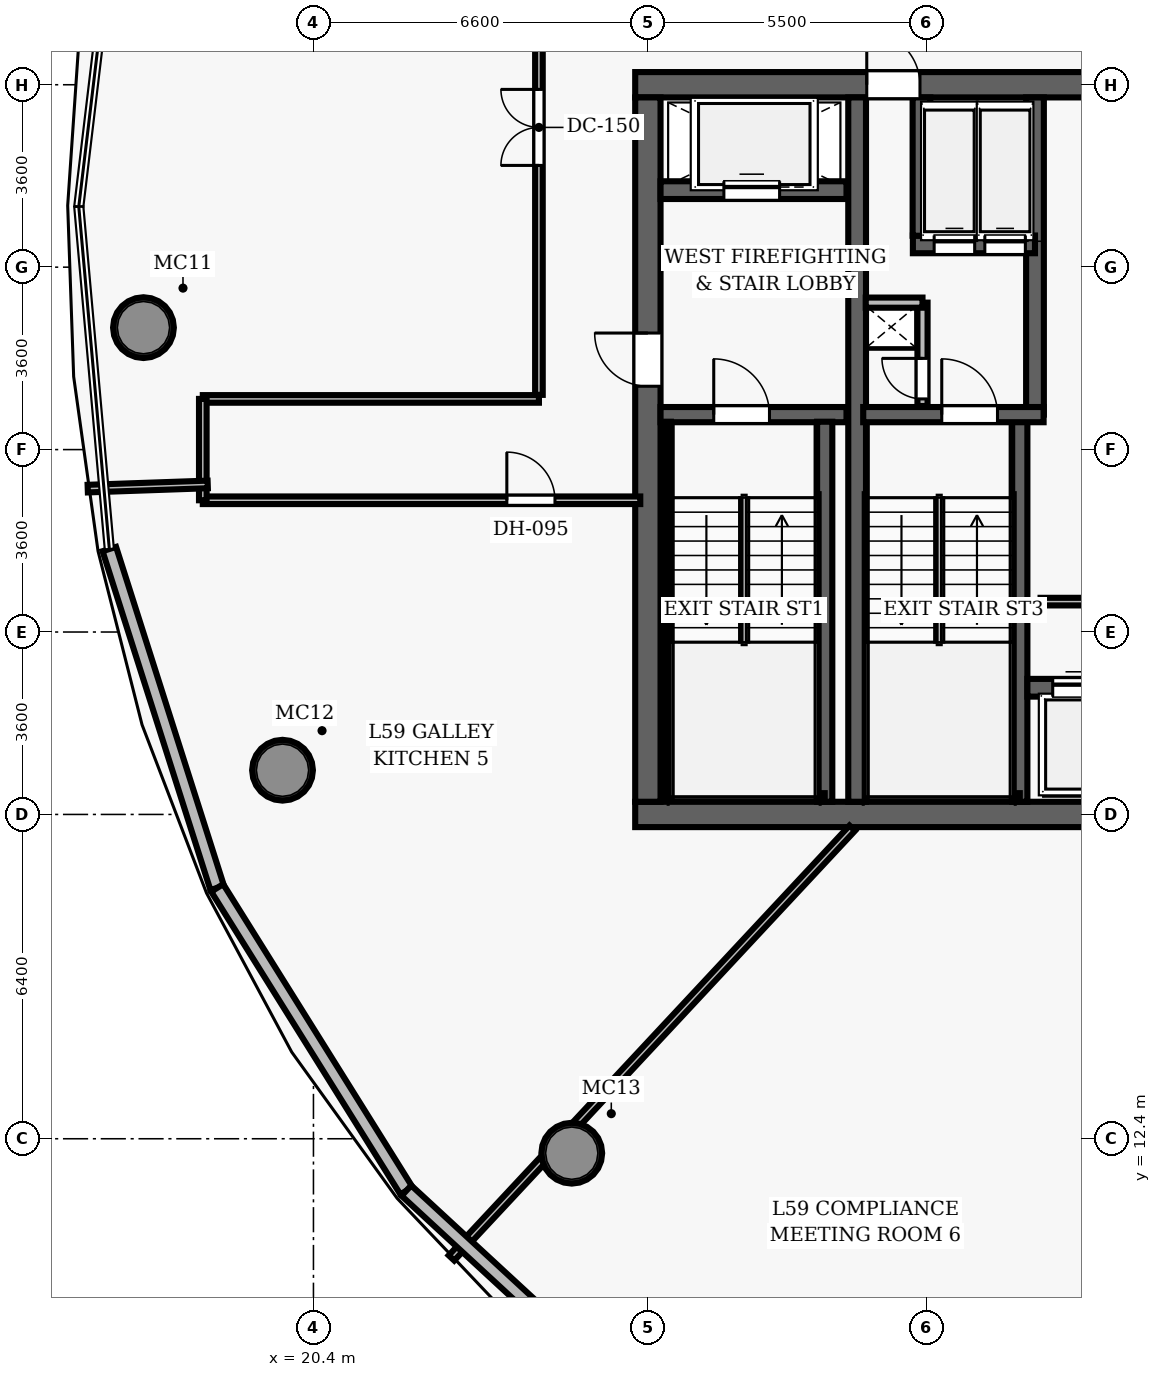
"""IFC4 building model, lengths in metres.
Left out: names, types, materials, properties, quantities, classifications, styles, units other than length and angle.
Written with IfcOpenShell. Run it as: python <this file> out.ifc"""

import sys

from ifc_helpers import new_model, si_unit, direction, frame, frame_2d, origin, origin_2d, place, context, subcontext, project, spatial, rectangle, hollow_circle, extrude, element, fill, save


model = new_model("IFC4")
c1 = context("Model", 3, precision=1e-05, world=origin(), true_north=direction((0.0, 1.0)))
c2 = subcontext(c1, "Body", "Model", "MODEL_VIEW")
j1 = project(units=[si_unit("LENGTHUNIT", "METRE"), si_unit("PLANEANGLEUNIT", "RADIAN")], contexts=[c1])
p1 = place(None, origin())
s1 = spatial("IfcSite", under=j1, at=p1, CompositionType="ELEMENT")
p2 = place(p1, origin())
s2 = spatial("IfcBuilding", under=s1, at=p2, CompositionType="ELEMENT")
p3 = place(p2, frame((0.0, 0.0, 232.8)))
s3 = spatial("IfcBuildingStorey", under=s2, at=p3, CompositionType="ELEMENT", Elevation=232.8)
p4 = place(p3, frame((26.75, 18.8, 0.0), z_axis=(0.0, 0.0, 1.0), x_axis=(1.0, 0.0, 0.0)))
e1 = element("IfcWall", 1, at=p4, inside=s3, PredefinedType="SHEAR", context=c2, shape_type="SweptSolid", body=[
    extrude(rectangle(XDim=22.5, YDim=0.5, at=frame_2d((11.25, 0.0))), origin(), (0.0, 0.0, 1.0), 3.85),
])
p5 = place(p4, frame((14.47, 0.0, 0.0)))
e2 = element("IfcOpeningElement", 2, at=p5, cuts=e1, PredefinedType="OPENING", context=c2, shape_type="SweptSolid", body=[
    extrude(rectangle(XDim=1.05, YDim=2.15, at=frame_2d((0.525, 1.075))), frame((0.0, 0.26, 0.0), z_axis=(0.0, -1.0, 0.0), x_axis=(1.0, 0.0, 0.0)), (0.0, 0.0, 1.0), 0.52),
])
p6 = place(p3, frame((26.75, 33.2, 0.0), z_axis=(0.0, 0.0, 1.0), x_axis=(1.0, 0.0, 0.0)))
e3 = element("IfcWall", 3, at=p6, inside=s3, PredefinedType="SHEAR", context=c2, shape_type="SweptSolid", body=[
    extrude(rectangle(XDim=22.5, YDim=0.5, at=frame_2d((11.25, 0.0))), origin(), (0.0, 0.0, 1.0), 3.85),
])
p7 = place(p6, frame((4.57, 0.0, 0.0)))
e4 = element("IfcOpeningElement", 4, at=p7, cuts=e3, PredefinedType="OPENING", context=c2, shape_type="SweptSolid", body=[
    extrude(rectangle(XDim=1.05, YDim=2.15, at=frame_2d((0.525, 1.075))), frame((0.0, 0.26, 0.0), z_axis=(0.0, -1.0, 0.0), x_axis=(1.0, 0.0, 0.0)), (0.0, 0.0, 1.0), 0.52),
])
p8 = place(p6, frame((14.47, 0.0, 0.0)))
e5 = element("IfcOpeningElement", 5, at=p8, cuts=e3, PredefinedType="OPENING", context=c2, shape_type="SweptSolid", body=[
    extrude(rectangle(XDim=1.05, YDim=2.15, at=frame_2d((0.525, 1.075))), frame((0.0, 0.26, 0.0), z_axis=(0.0, -1.0, 0.0), x_axis=(1.0, 0.0, 0.0)), (0.0, 0.0, 1.0), 0.52),
])
p9 = place(p3, frame((27.0, 19.05, 0.0), z_axis=(0.0, 0.0, 1.0), x_axis=(0.0, 1.0, 0.0)))
e6 = element("IfcWall", 6, at=p9, inside=s3, PredefinedType="SHEAR", context=c2, shape_type="SweptSolid", body=[
    extrude(rectangle(XDim=13.9, YDim=0.5, at=frame_2d((6.95, 0.0))), origin(), (0.0, 0.0, 1.0), 3.85),
])
p10 = place(p9, frame((8.2, 0.0, 0.0)))
e7 = element("IfcOpeningElement", 7, at=p10, cuts=e6, PredefinedType="OPENING", context=c2, shape_type="SweptSolid", body=[
    extrude(rectangle(XDim=1.05, YDim=2.15, at=frame_2d((0.525, 1.075))), frame((0.0, 0.26, 0.0), z_axis=(0.0, -1.0, 0.0), x_axis=(1.0, 0.0, 0.0)), (0.0, 0.0, 1.0), 0.52),
])
p11 = place(p3, frame((31.13, 19.05, 0.0), z_axis=(0.0, 0.0, 1.0), x_axis=(0.0, 1.0, 0.0)))
e8 = element("IfcWall", 8, at=p11, inside=s3, PredefinedType="SHEAR", context=c2, shape_type="SweptSolid", body=[
    extrude(rectangle(XDim=13.9, YDim=0.35, at=frame_2d((6.95, 0.0))), origin(), (0.0, 0.0, 1.0), 3.85),
])
for number, where, z_axis, x_axis in (
    (9, (17.045, 28.406, 0.0), (0.0, 0.0, 1.0), (1.0, 0.0, 0.0)),
    (10, (19.79, 19.673, 0.0), (0.0, 0.0, 1.0), (1.0, 0.0, 0.0)),
    (11, (25.498, 12.115, 0.0), (0.0, 0.0, 1.0), (1.0, 0.0, 0.0)),
):
    element("IfcColumn", number, at=place(p3, frame(where, z_axis=z_axis, x_axis=x_axis)), inside=s3, PredefinedType="COLUMN", context=c2, shape_type="SweptSolid", body=[
        extrude(hollow_circle(Radius=0.6, WallThickness=0.05, at=origin_2d()), origin(), (0.0, 0.0, 1.0), 3.85),
    ])
p12 = place(p3, frame((27.25, 26.69, 0.0), z_axis=(0.0, 0.0, 1.0), x_axis=(1.0, 0.0, 0.0)))
e12 = element("IfcWall", 12, at=p12, inside=s3, PredefinedType="SHEAR", context=c2, shape_type="SweptSolid", body=[
    extrude(rectangle(XDim=3.67, YDim=0.3, at=frame_2d((1.835, 0.0))), origin(), (0.0, 0.0, 1.0), 3.85),
])
p13 = place(p12, frame((1.05, 0.0, 0.0)))
e13 = element("IfcOpeningElement", 13, at=p13, cuts=e12, PredefinedType="OPENING", context=c2, shape_type="SweptSolid", body=[
    extrude(rectangle(XDim=1.1, YDim=2.15, at=frame_2d((0.55, 1.075))), frame((0.0, 0.16, 0.0), z_axis=(0.0, -1.0, 0.0), x_axis=(1.0, 0.0, 0.0)), (0.0, 0.0, 1.0), 0.32),
])
p14 = place(p3, frame((30.49, 19.05, 0.0), z_axis=(0.0, 0.0, 1.0), x_axis=(0.0, 1.0, 0.0)))
e14 = element("IfcWall", 14, at=p14, inside=s3, PredefinedType="SHEAR", context=c2, shape_type="SweptSolid", body=[
    extrude(rectangle(XDim=7.5, YDim=0.3, at=frame_2d((3.75, 0.0))), origin(), (0.0, 0.0, 1.0), 3.85),
])
p15 = place(p3, frame((27.395, 19.1, 0.0), z_axis=(0.0, 0.0, 1.0), x_axis=(0.0, 1.0, 0.0)))
e15 = element("IfcWall", 15, at=p15, inside=s3, PredefinedType="SHEAR", context=c2, shape_type="SweptSolid", body=[
    extrude(rectangle(XDim=7.45, YDim=0.12, at=frame_2d((3.725, 0.0))), origin(), (0.0, 0.0, 1.0), 3.85),
])
p16 = place(p3, frame((27.395, 19.16, 0.0), z_axis=(0.0, 0.0, 1.0), x_axis=(1.0, 0.0, 0.0)))
e16 = element("IfcWall", 16, at=p16, inside=s3, PredefinedType="SHEAR", context=c2, shape_type="SweptSolid", body=[
    extrude(rectangle(XDim=3.095, YDim=0.12, at=frame_2d((1.547, 0.0))), origin(), (0.0, 0.0, 1.0), 3.85),
])
p17 = place(p3, frame((27.25, 31.12, 0.0), z_axis=(0.0, 0.0, 1.0), x_axis=(1.0, 0.0, 0.0)))
e17 = element("IfcWall", 17, at=p17, inside=s3, PredefinedType="SHEAR", context=c2, shape_type="SweptSolid", body=[
    extrude(rectangle(XDim=3.67, YDim=0.35, at=frame_2d((1.835, 0.0))), origin(), (0.0, 0.0, 1.0), 2.915),
])
p18 = place(p17, frame((1.25, 0.0, 0.0)))
e18 = element("IfcOpeningElement", 18, at=p18, cuts=e17, PredefinedType="OPENING", context=c2, shape_type="SweptSolid", body=[
    extrude(rectangle(XDim=1.1, YDim=2.15, at=frame_2d((0.55, 1.075))), frame((0.0, 0.185, 0.0), z_axis=(0.0, -1.0, 0.0), x_axis=(1.0, 0.0, 0.0)), (0.0, 0.0, 1.0), 0.37),
])
p19 = place(p3, frame((34.34, 19.05, 0.0), z_axis=(0.0, 0.0, 1.0), x_axis=(0.0, 1.0, 0.0)))
e19 = element("IfcWall", 19, at=p19, inside=s3, PredefinedType="SHEAR", context=c2, shape_type="SweptSolid", body=[
    extrude(rectangle(XDim=7.5, YDim=0.3, at=frame_2d((3.75, 0.0))), origin(), (0.0, 0.0, 1.0), 3.85),
])
p20 = place(p3, frame((34.64, 26.69, 0.0), z_axis=(0.0, 0.0, 1.0), x_axis=(0.0, 1.0, 0.0)))
e20 = element("IfcWall", 20, at=p20, inside=s3, PredefinedType="SHEAR", context=c2, shape_type="SweptSolid", body=[
    extrude(rectangle(XDim=6.26, YDim=0.35, at=frame_2d((3.13, 0.0))), origin(), (0.0, 0.0, 1.0), 3.85),
])
p21 = place(p3, frame((31.25, 26.69, 0.0), z_axis=(0.0, 0.0, 1.0), x_axis=(1.0, 0.0, 0.0)))
e21 = element("IfcWall", 21, at=p21, inside=s3, PredefinedType="SHEAR", context=c2, shape_type="SweptSolid", body=[
    extrude(rectangle(XDim=3.56, YDim=0.3, at=frame_2d((1.78, 0.0))), origin(), (0.0, 0.0, 1.0), 3.85),
])
p22 = place(p21, frame((1.55, 0.0, 0.0)))
e22 = element("IfcOpeningElement", 22, at=p22, cuts=e21, PredefinedType="OPENING", context=c2, shape_type="SweptSolid", body=[
    extrude(rectangle(XDim=1.1, YDim=2.15, at=frame_2d((0.55, 1.075))), frame((0.0, 0.16, 0.0), z_axis=(0.0, -1.0, 0.0), x_axis=(1.0, 0.0, 0.0)), (0.0, 0.0, 1.0), 0.32),
])
p23 = place(p3, frame((31.3, 19.16, 0.0), z_axis=(0.0, 0.0, 1.0), x_axis=(1.0, 0.0, 0.0)))
e23 = element("IfcWall", 23, at=p23, inside=s3, PredefinedType="SHEAR", context=c2, shape_type="SweptSolid", body=[
    extrude(rectangle(XDim=3.04, YDim=0.12, at=frame_2d((1.52, 0.0))), origin(), (0.0, 0.0, 1.0), 3.85),
])
p24 = place(p3, frame((32.23, 30.05, 0.0), z_axis=(0.0, 0.0, 1.0), x_axis=(1.0, 0.0, 0.0)))
e24 = element("IfcWall", 24, at=p24, inside=s3, PredefinedType="SHEAR", context=c2, shape_type="SweptSolid", body=[
    extrude(rectangle(XDim=2.41, YDim=0.35, at=frame_2d((1.205, 0.0))), origin(), (0.0, 0.0, 1.0), 2.915),
])
p25 = place(p24, frame((0.42, 0.0, 0.0)))
e25 = element("IfcOpeningElement", 25, at=p25, cuts=e24, PredefinedType="OPENING", context=c2, shape_type="SweptSolid", body=[
    extrude(rectangle(XDim=0.8, YDim=2.15, at=frame_2d((0.4, 1.075))), frame((0.0, 0.185, 0.0), z_axis=(0.0, -1.0, 0.0), x_axis=(1.0, 0.0, 0.0)), (0.0, 0.0, 1.0), 0.37),
])
p26 = place(p24, frame((1.42, 0.0, 0.0)))
e26 = element("IfcOpeningElement", 26, at=p26, cuts=e24, PredefinedType="OPENING", context=c2, shape_type="SweptSolid", body=[
    extrude(rectangle(XDim=0.8, YDim=2.15, at=frame_2d((0.4, 1.075))), frame((0.0, 0.185, 0.0), z_axis=(0.0, -1.0, 0.0), x_axis=(1.0, 0.0, 0.0)), (0.0, 0.0, 1.0), 0.37),
])
p27 = place(p3, frame((32.4, 30.22, 0.0), z_axis=(0.0, 0.0, 1.0), x_axis=(0.0, 1.0, 0.0)))
e27 = element("IfcWall", 27, at=p27, inside=s3, PredefinedType="SHEAR", context=c2, shape_type="SweptSolid", body=[
    extrude(rectangle(XDim=2.73, YDim=0.35, at=frame_2d((1.365, 0.0))), origin(), (0.0, 0.0, 1.0), 2.915),
])
p28 = place(p3, frame((32.42, 26.86, 0.0), z_axis=(0.0, 0.0, 1.0), x_axis=(0.0, 1.0, 0.0)))
e28 = element("IfcWall", 28, at=p28, inside=s3, PredefinedType="PARTITIONING", context=c2, shape_type="SweptSolid", body=[
    extrude(rectangle(XDim=2.04, YDim=0.2, at=frame_2d((1.02, 0.0))), origin(), (0.0, 0.0, 1.0), 2.915),
])
p29 = place(p28, frame((0.14, 0.0, 0.0)))
e29 = element("IfcOpeningElement", 29, at=p29, cuts=e28, PredefinedType="OPENING", context=c2, shape_type="SweptSolid", body=[
    extrude(rectangle(XDim=0.8, YDim=2.05, at=frame_2d((0.4, 1.025))), frame((0.0, 0.11, 0.0), z_axis=(0.0, -1.0, 0.0), x_axis=(1.0, 0.0, 0.0)), (0.0, 0.0, 1.0), 0.22),
])
p30 = place(p3, frame((31.3, 28.9, 0.0), z_axis=(0.0, 0.0, 1.0), x_axis=(1.0, 0.0, 0.0)))
e30 = element("IfcWall", 30, at=p30, inside=s3, PredefinedType="PARTITIONING", context=c2, shape_type="SweptSolid", body=[
    extrude(rectangle(XDim=1.12, YDim=0.2, at=frame_2d((0.56, 0.0))), origin(), (0.0, 0.0, 1.0), 2.915),
])
p31 = place(p3, frame((34.49, 21.3, 0.0), z_axis=(0.0, 0.0, 1.0), x_axis=(1.0, 0.0, 0.0)))
e31 = element("IfcWall", 31, at=p31, inside=s3, PredefinedType="SHEAR", context=c2, shape_type="SweptSolid", body=[
    extrude(rectangle(XDim=6.68, YDim=0.35, at=frame_2d((3.34, 0.0))), origin(), (0.0, 0.0, 1.0), 2.915),
])
p32 = place(p31, frame((0.5, 0.0, 0.0)))
e32 = element("IfcOpeningElement", 32, at=p32, cuts=e31, PredefinedType="OPENING", context=c2, shape_type="SweptSolid", body=[
    extrude(rectangle(XDim=0.9, YDim=2.15, at=frame_2d((0.45, 1.075))), frame((0.0, 0.185, 0.0), z_axis=(0.0, -1.0, 0.0), x_axis=(1.0, 0.0, 0.0)), (0.0, 0.0, 1.0), 0.37),
])
p33 = place(p31, frame((2.58, 0.0, 0.0)))
e33 = element("IfcOpeningElement", 33, at=p33, cuts=e31, PredefinedType="OPENING", context=c2, shape_type="SweptSolid", body=[
    extrude(rectangle(XDim=0.9, YDim=2.15, at=frame_2d((0.45, 1.075))), frame((0.0, 0.185, 0.0), z_axis=(0.0, -1.0, 0.0), x_axis=(1.0, 0.0, 0.0)), (0.0, 0.0, 1.0), 0.37),
])
p34 = place(p31, frame((4.66, 0.0, 0.0)))
e34 = element("IfcOpeningElement", 34, at=p34, cuts=e31, PredefinedType="OPENING", context=c2, shape_type="SweptSolid", body=[
    extrude(rectangle(XDim=0.9, YDim=2.15, at=frame_2d((0.45, 1.075))), frame((0.0, 0.185, 0.0), z_axis=(0.0, -1.0, 0.0), x_axis=(1.0, 0.0, 0.0)), (0.0, 0.0, 1.0), 0.37),
])
p35 = place(p3, frame((34.75, 23.0, 0.0), z_axis=(0.0, 0.0, 1.0), x_axis=(1.0, 0.0, 0.0)))
e35 = element("IfcWall", 35, at=p35, inside=s3, PredefinedType="PARTITIONING", context=c2, shape_type="SweptSolid", body=[
    extrude(rectangle(XDim=6.25, YDim=0.15, at=frame_2d((3.125, 0.0))), origin(), (0.0, 0.0, 1.0), 2.915),
])
p36 = place(p3, frame((24.85, 27.08, 0.0), z_axis=(0.0, 0.0, 1.0), x_axis=(0.0, 1.0, 0.0)))
e36 = element("IfcWall", 36, at=p36, inside=s3, PredefinedType="PARTITIONING", context=c2, shape_type="SweptSolid", body=[
    extrude(rectangle(XDim=8.12, YDim=0.15, at=frame_2d((4.06, 0.0))), origin(), (0.0, 0.0, 1.0), 2.915),
])
p37 = place(p36, frame((4.528, 0.0, 0.0)))
e37 = element("IfcOpeningElement", 37, at=p37, cuts=e36, PredefinedType="OPENING", context=c2, shape_type="SweptSolid", body=[
    extrude(rectangle(XDim=1.5, YDim=2.2, at=frame_2d((0.75, 1.1))), frame((0.0, 0.085, 0.0), z_axis=(0.0, -1.0, 0.0), x_axis=(1.0, 0.0, 0.0)), (0.0, 0.0, 1.0), 0.17),
])
p38 = place(p3, frame((18.216, 27.0, 0.0), z_axis=(0.0, 0.0, 1.0), x_axis=(1.0, 0.0, 0.0)))
e38 = element("IfcWall", 38, at=p38, inside=s3, PredefinedType="PARTITIONING", context=c2, shape_type="SweptSolid", body=[
    extrude(rectangle(XDim=6.634, YDim=0.15, at=frame_2d((3.317, 0.0))), origin(), (0.0, 0.0, 1.0), 2.915),
])
p39 = place(p3, frame((18.216, 25.0, 0.0), z_axis=(0.0, 0.0, 1.0), x_axis=(1.0, 0.0, 0.0)))
e39 = element("IfcWall", 39, at=p39, inside=s3, PredefinedType="PARTITIONING", context=c2, shape_type="SweptSolid", body=[
    extrude(rectangle(XDim=8.634, YDim=0.15, at=frame_2d((4.317, 0.0))), origin(), (0.0, 0.0, 1.0), 2.915),
])
p40 = place(p39, frame((6.0, 0.0, 0.0)))
e40 = element("IfcOpeningElement", 40, at=p40, cuts=e39, PredefinedType="OPENING", context=c2, shape_type="SweptSolid", body=[
    extrude(rectangle(XDim=0.95, YDim=2.15, at=frame_2d((0.475, 1.075))), frame((0.0, 0.085, 0.0), z_axis=(0.0, -1.0, 0.0), x_axis=(1.0, 0.0, 0.0)), (0.0, 0.0, 1.0), 0.17),
])
p41 = place(p3, frame((18.216, 25.0, 0.0), z_axis=(0.0, 0.0, 1.0), x_axis=(0.0, 1.0, 0.0)))
e41 = element("IfcWall", 41, at=p41, inside=s3, PredefinedType="PARTITIONING", context=c2, shape_type="SweptSolid", body=[
    extrude(rectangle(XDim=2.0, YDim=0.15, at=frame_2d((1.0, 0.0))), origin(), (0.0, 0.0, 1.0), 2.915),
])
p42 = place(p3, frame((18.313, 25.312, 0.0), z_axis=(0.0, 0.0, 1.0), x_axis=(-0.999389861653, -0.034927130217, 0.0)))
e42 = element("IfcWall", 42, at=p42, inside=s3, PredefinedType="PARTITIONING", context=c2, shape_type="SweptSolid", body=[
    extrude(rectangle(XDim=2.37, YDim=0.15, at=frame_2d((1.185, 0.0))), origin(), (0.0, 0.0, 1.0), 2.915),
])
p43 = place(p3, frame((31.034, 18.53, 0.0), z_axis=(0.0, 0.0, 1.0), x_axis=(-0.681994935562, -0.731356895002, 0.0)))
e43 = element("IfcWall", 43, at=p43, inside=s3, PredefinedType="PARTITIONING", context=c2, shape_type="SweptSolid", body=[
    extrude(rectangle(XDim=11.598, YDim=0.15, at=frame_2d((5.799, 0.0))), origin(), (0.0, 0.0, 1.0), 2.915),
])
p44 = place(p3, frame((18.5, 17.351, 0.0), z_axis=(0.0, 0.0, 1.0), x_axis=(-0.303361607716, 0.952875508639, 0.0)))
e44 = element("IfcWall", 44, at=p44, inside=s3, PredefinedType="SOLIDWALL", context=c2, shape_type="SweptSolid", body=[
    extrude(rectangle(XDim=7.018, YDim=0.28, at=frame_2d((3.509, 0.0))), origin(), (0.0, 0.0, 1.0), 3.5),
])
p45 = place(p3, frame((22.234, 11.376, 0.0), z_axis=(0.0, 0.0, 1.0), x_axis=(-0.529974021184, 0.848013877758, 0.0)))
e45 = element("IfcWall", 45, at=p45, inside=s3, PredefinedType="SOLIDWALL", context=c2, shape_type="SweptSolid", body=[
    extrude(rectangle(XDim=7.045, YDim=0.28, at=frame_2d((3.523, 0.0))), origin(), (0.0, 0.0, 1.0), 3.5),
])
p46 = place(p3, frame((27.412, 6.597, 0.0), z_axis=(0.0, 0.0, 1.0), x_axis=(-0.734865878673, 0.678212459604, 0.0)))
e46 = element("IfcWall", 46, at=p46, inside=s3, PredefinedType="SOLIDWALL", context=c2, shape_type="SweptSolid", body=[
    extrude(rectangle(XDim=7.046, YDim=0.28, at=frame_2d((3.523, 0.0))), origin(), (0.0, 0.0, 1.0), 3.5),
])
p47 = place(p13, origin())
e47 = element("IfcDoor", 47, at=p47, inside=s3, OperationType="SINGLE_SWING_LEFT", PredefinedType="DOOR", context=c2, shape_type="SweptSolid", body=[
    extrude(rectangle(XDim=1.1, YDim=2.15, at=frame_2d((0.55, 1.075))), frame((0.0, 0.025, 0.0), z_axis=(0.0, -1.0, 0.0), x_axis=(1.0, 0.0, 0.0)), (0.0, 0.0, 1.0), 0.05),
])
fill(e13, e47)
p48 = place(p10, origin())
e48 = element("IfcDoor", 48, at=p48, inside=s3, OperationType="SINGLE_SWING_RIGHT", PredefinedType="DOOR", context=c2, shape_type="SweptSolid", body=[
    extrude(rectangle(XDim=1.05, YDim=2.15, at=frame_2d((0.525, 1.075))), frame((0.0, 0.025, 0.0), z_axis=(0.0, -1.0, 0.0), x_axis=(1.0, 0.0, 0.0)), (0.0, 0.0, 1.0), 0.05),
])
fill(e7, e48)
p49 = place(p22, origin())
e49 = element("IfcDoor", 49, at=p49, inside=s3, OperationType="SINGLE_SWING_LEFT", PredefinedType="DOOR", context=c2, shape_type="SweptSolid", body=[
    extrude(rectangle(XDim=1.1, YDim=2.15, at=frame_2d((0.55, 1.075))), frame((0.0, 0.025, 0.0), z_axis=(0.0, -1.0, 0.0), x_axis=(1.0, 0.0, 0.0)), (0.0, 0.0, 1.0), 0.05),
])
fill(e22, e49)
p50 = place(p29, origin())
e50 = element("IfcDoor", 50, at=p50, inside=s3, OperationType="SINGLE_SWING_RIGHT", PredefinedType="DOOR", context=c2, shape_type="SweptSolid", body=[
    extrude(rectangle(XDim=0.8, YDim=2.05, at=frame_2d((0.4, 1.025))), frame((0.0, 0.025, 0.0), z_axis=(0.0, -1.0, 0.0), x_axis=(1.0, 0.0, 0.0)), (0.0, 0.0, 1.0), 0.05),
])
fill(e29, e50)
p51 = place(p7, origin())
e51 = element("IfcDoor", 51, at=p51, inside=s3, OperationType="SINGLE_SWING_LEFT", PredefinedType="DOOR", context=c2, shape_type="SweptSolid", body=[
    extrude(rectangle(XDim=1.05, YDim=2.15, at=frame_2d((0.525, 1.075))), frame((0.0, 0.025, 0.0), z_axis=(0.0, -1.0, 0.0), x_axis=(1.0, 0.0, 0.0)), (0.0, 0.0, 1.0), 0.05),
])
fill(e4, e51)
p52 = place(p37, origin())
e52 = element("IfcDoor", 52, at=p52, inside=s3, OperationType="DOUBLE_DOOR_SINGLE_SWING", PredefinedType="DOOR", context=c2, shape_type="SweptSolid", body=[
    extrude(rectangle(XDim=1.5, YDim=2.2, at=frame_2d((0.75, 1.1))), frame((0.0, 0.025, 0.0), z_axis=(0.0, -1.0, 0.0), x_axis=(1.0, 0.0, 0.0)), (0.0, 0.0, 1.0), 0.05),
])
fill(e37, e52)
p53 = place(p40, origin())
e53 = element("IfcDoor", 53, at=p53, inside=s3, OperationType="SINGLE_SWING_LEFT", PredefinedType="DOOR", context=c2, shape_type="SweptSolid", body=[
    extrude(rectangle(XDim=0.95, YDim=2.15, at=frame_2d((0.475, 1.075))), frame((0.0, 0.025, 0.0), z_axis=(0.0, -1.0, 0.0), x_axis=(1.0, 0.0, 0.0)), (0.0, 0.0, 1.0), 0.05),
])
fill(e40, e53)
p54 = place(p32, origin())
e54 = element("IfcDoor", 54, at=p54, inside=s3, OperationType="SLIDING_TO_LEFT", PredefinedType="DOOR", context=c2, shape_type="SweptSolid", body=[
    extrude(rectangle(XDim=0.9, YDim=2.15, at=frame_2d((0.45, 1.075))), frame((0.0, 0.025, 0.0), z_axis=(0.0, -1.0, 0.0), x_axis=(1.0, 0.0, 0.0)), (0.0, 0.0, 1.0), 0.05),
])
fill(e32, e54)
p55 = place(p18, origin())
e55 = element("IfcDoor", 55, at=p55, inside=s3, OperationType="SLIDING_TO_LEFT", PredefinedType="DOOR", context=c2, shape_type="SweptSolid", body=[
    extrude(rectangle(XDim=1.1, YDim=2.15, at=frame_2d((0.55, 1.075))), frame((0.0, 0.025, 0.0), z_axis=(0.0, -1.0, 0.0), x_axis=(1.0, 0.0, 0.0)), (0.0, 0.0, 1.0), 0.05),
])
fill(e18, e55)
p56 = place(p25, origin())
e56 = element("IfcDoor", 56, at=p56, inside=s3, OperationType="SLIDING_TO_LEFT", PredefinedType="DOOR", context=c2, shape_type="SweptSolid", body=[
    extrude(rectangle(XDim=0.8, YDim=2.15, at=frame_2d((0.4, 1.075))), frame((0.0, 0.025, 0.0), z_axis=(0.0, -1.0, 0.0), x_axis=(1.0, 0.0, 0.0)), (0.0, 0.0, 1.0), 0.05),
])
fill(e25, e56)
p57 = place(p26, origin())
e57 = element("IfcDoor", 57, at=p57, inside=s3, OperationType="SLIDING_TO_LEFT", PredefinedType="DOOR", context=c2, shape_type="SweptSolid", body=[
    extrude(rectangle(XDim=0.8, YDim=2.15, at=frame_2d((0.4, 1.075))), frame((0.0, 0.025, 0.0), z_axis=(0.0, -1.0, 0.0), x_axis=(1.0, 0.0, 0.0)), (0.0, 0.0, 1.0), 0.05),
])
fill(e26, e57)
save(model, sys.argv[1])
